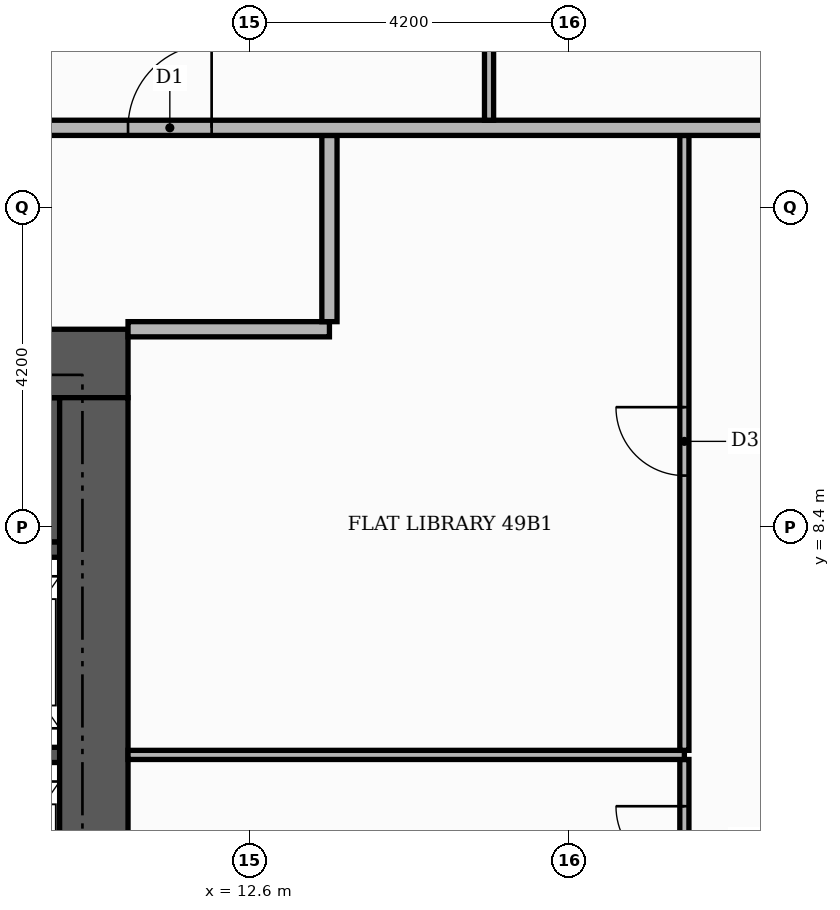
"""IFC4 building model, lengths in metres.
Left out: names, types, materials, properties, quantities, classifications, styles, units other than length and angle.
Written with IfcOpenShell. Run it as: python <this file> out.ifc"""

import sys

from ifc_helpers import new_model, si_unit, direction, frame, frame_2d, origin, place, context, subcontext, project, spatial, rectangle, extrude, element, fill, save


model = new_model("IFC4")
c1 = context("Model", 3, precision=1e-05, world=origin(), true_north=direction((0.0, 1.0)))
c2 = subcontext(c1, "Body", "Model", "MODEL_VIEW")
j1 = project(units=[si_unit("LENGTHUNIT", "METRE"), si_unit("PLANEANGLEUNIT", "RADIAN")], contexts=[c1])
p1 = place(None, origin())
s1 = spatial("IfcSite", under=j1, at=p1, CompositionType="ELEMENT")
p2 = place(p1, origin())
s2 = spatial("IfcBuilding", under=s1, at=p2, CompositionType="ELEMENT")
p3 = place(p2, frame((0.0, 0.0, 207.9)))
s3 = spatial("IfcBuildingStorey", under=s2, at=p3, CompositionType="ELEMENT", Elevation=207.9)
p4 = place(p3, frame((5.5, 9.15, 0.0), z_axis=(0.0, 0.0, 1.0), x_axis=(1.0, 0.0, 0.0)))
e1 = element("IfcWall", 1, at=p4, inside=s3, PredefinedType="SHEAR", context=c2, shape_type="SweptSolid", body=[
    extrude(rectangle(XDim=4.6, YDim=1.9, at=frame_2d((2.3, 0.0))), origin(), (0.0, 0.0, 1.0), 3.48),
])
for number, where, z_axis, x_axis in (
    (2, (8.1, 5.4, 0.0), (0.0, 0.0, 1.0), (1.0, 0.0, 0.0)),
    (3, (8.1, 8.1, 0.0), (0.0, 0.0, 1.0), (1.0, 0.0, 0.0)),
):
    element("IfcWall", number, at=place(p3, frame(where, z_axis=z_axis, x_axis=x_axis)), inside=s3, PredefinedType="SHEAR", context=c2, shape_type="SweptSolid", body=[
        extrude(rectangle(XDim=2.0, YDim=0.2, at=frame_2d((1.0, 0.0))), origin(), (0.0, 0.0, 1.0), 3.48),
    ])
p5 = place(p3, frame((-11.0, 10.55, 0.0), z_axis=(0.0, 0.0, 1.0), x_axis=(1.0, 0.0, 0.0)))
e4 = element("IfcWall", 4, at=p5, inside=s3, PredefinedType="SHEAR", context=c2, shape_type="SweptSolid", body=[
    extrude(rectangle(XDim=22.0, YDim=0.9, at=frame_2d((11.0, 0.0))), origin(), (0.0, 0.0, 1.0), 3.48),
])
p6 = place(p5, frame((13.3, 0.0, 0.0)))
e5 = element("IfcOpeningElement", 5, at=p6, cuts=e4, PredefinedType="OPENING", context=c2, shape_type="SweptSolid", body=[
    extrude(rectangle(XDim=1.8, YDim=2.2, at=frame_2d((0.9, 1.1))), frame((0.0, 0.46, 0.0), z_axis=(0.0, -1.0, 0.0), x_axis=(1.0, 0.0, 0.0)), (0.0, 0.0, 1.0), 0.92),
])
p7 = place(p3, frame((10.55, -10.1, 0.0), z_axis=(0.0, 0.0, 1.0), x_axis=(0.0, 1.0, 0.0)))
e6 = element("IfcWall", 6, at=p7, inside=s3, PredefinedType="SHEAR", context=c2, shape_type="SweptSolid", body=[
    extrude(rectangle(XDim=20.2, YDim=0.9, at=frame_2d((10.1, 0.0))), origin(), (0.0, 0.0, 1.0), 3.48),
])
p8 = place(p3, frame((18.32, 3.21, 0.0), z_axis=(0.0, 0.0, 1.0), x_axis=(0.0, 1.0, 0.0)))
e7 = element("IfcWall", 7, at=p8, inside=s3, PredefinedType="PARTITIONING", context=c2, shape_type="SweptSolid", body=[
    extrude(rectangle(XDim=2.13, YDim=0.12, at=frame_2d((1.065, 0.0))), origin(), (0.0, 0.0, 1.0), 3.48),
])
p9 = place(p8, frame((0.615, 0.0, 0.0)))
e8 = element("IfcOpeningElement", 8, at=p9, cuts=e7, PredefinedType="OPENING", context=c2, shape_type="SweptSolid", body=[
    extrude(rectangle(XDim=0.9, YDim=2.1, at=frame_2d((0.45, 1.05))), frame((0.0, 0.07, 0.0), z_axis=(0.0, -1.0, 0.0), x_axis=(1.0, 0.0, 0.0)), (0.0, 0.0, 1.0), 0.14),
])
p10 = place(p3, frame((11.0, 5.4, 0.0), z_axis=(0.0, 0.0, 1.0), x_axis=(1.0, 0.0, 0.0)))
e9 = element("IfcWall", 9, at=p10, inside=s3, PredefinedType="PARTITIONING", context=c2, shape_type="SweptSolid", body=[
    extrude(rectangle(XDim=7.32, YDim=0.12, at=frame_2d((3.66, 0.0))), origin(), (0.0, 0.0, 1.0), 3.48),
])
p11 = place(p3, frame((18.32, 5.46, 0.0), z_axis=(0.0, 0.0, 1.0), x_axis=(0.0, 1.0, 0.0)))
e10 = element("IfcWall", 10, at=p11, inside=s3, PredefinedType="PARTITIONING", context=c2, shape_type="SweptSolid", body=[
    extrude(rectangle(XDim=8.09, YDim=0.12, at=frame_2d((4.045, 0.0))), origin(), (0.0, 0.0, 1.0), 3.48),
])
p12 = place(p11, frame((3.615, 0.0, 0.0)))
e11 = element("IfcOpeningElement", 11, at=p12, cuts=e10, PredefinedType="OPENING", context=c2, shape_type="SweptSolid", body=[
    extrude(rectangle(XDim=0.9, YDim=2.1, at=frame_2d((0.45, 1.05))), frame((0.0, 0.07, 0.0), z_axis=(0.0, -1.0, 0.0), x_axis=(1.0, 0.0, 0.0)), (0.0, 0.0, 1.0), 0.14),
])
p13 = place(p3, frame((11.0, 11.0, 0.0), z_axis=(0.0, 0.0, 1.0), x_axis=(1.0, 0.0, 0.0)))
e12 = element("IfcWall", 12, at=p13, inside=s3, PredefinedType="PARTITIONING", context=c2, shape_type="SweptSolid", body=[
    extrude(rectangle(XDim=2.65, YDim=0.2, at=frame_2d((1.325, 0.0))), origin(), (0.0, 0.0, 1.0), 3.48),
])
p14 = place(p3, frame((13.65, 11.1, 0.0), z_axis=(0.0, 0.0, 1.0), x_axis=(0.0, 1.0, 0.0)))
e13 = element("IfcWall", 13, at=p14, inside=s3, PredefinedType="PARTITIONING", context=c2, shape_type="SweptSolid", body=[
    extrude(rectangle(XDim=2.45, YDim=0.2, at=frame_2d((1.225, 0.0))), origin(), (0.0, 0.0, 1.0), 3.48),
])
p15 = place(p3, frame((-13.65, 13.65, 0.0), z_axis=(0.0, 0.0, 1.0), x_axis=(1.0, 0.0, 0.0)))
e14 = element("IfcWall", 14, at=p15, inside=s3, PredefinedType="PARTITIONING", context=c2, shape_type="SweptSolid", body=[
    extrude(rectangle(XDim=39.07, YDim=0.2, at=frame_2d((19.535, 0.0))), origin(), (0.0, 0.0, 1.0), 3.48),
])
p16 = place(p15, frame((24.65, 0.0, 0.0)))
e15 = element("IfcOpeningElement", 15, at=p16, cuts=e14, PredefinedType="OPENING", context=c2, shape_type="SweptSolid", body=[
    extrude(rectangle(XDim=1.1, YDim=2.4, at=frame_2d((0.55, 1.2))), frame((0.0, 0.11, 0.0), z_axis=(0.0, -1.0, 0.0), x_axis=(1.0, 0.0, 0.0)), (0.0, 0.0, 1.0), 0.22),
])
p17 = place(p15, frame((12.05, 0.0, 0.0)))
e16 = element("IfcOpeningElement", 16, at=p17, cuts=e14, PredefinedType="OPENING", context=c2, shape_type="SweptSolid", body=[
    extrude(rectangle(XDim=1.1, YDim=2.4, at=frame_2d((0.55, 1.2))), frame((0.0, 0.11, 0.0), z_axis=(0.0, -1.0, 0.0), x_axis=(1.0, 0.0, 0.0)), (0.0, 0.0, 1.0), 0.22),
])
p18 = place(p3, frame((15.75, 13.75, 0.0), z_axis=(0.0, 0.0, 1.0), x_axis=(0.0, 1.0, 0.0)))
e17 = element("IfcWall", 17, at=p18, inside=s3, PredefinedType="PARTITIONING", context=c2, shape_type="SweptSolid", body=[
    extrude(rectangle(XDim=6.01, YDim=0.12, at=frame_2d((3.005, 0.0))), origin(), (0.0, 0.0, 1.0), 3.48),
])
p19 = place(p18, frame((2.485, 0.0, 0.0)))
e18 = element("IfcOpeningElement", 18, at=p19, cuts=e17, PredefinedType="OPENING", context=c2, shape_type="SweptSolid", body=[
    extrude(rectangle(XDim=1.0, YDim=2.1, at=frame_2d((0.5, 1.05))), frame((0.0, 0.07, 0.0), z_axis=(0.0, -1.0, 0.0), x_axis=(1.0, 0.0, 0.0)), (0.0, 0.0, 1.0), 0.14),
])
p20 = place(p9, origin())
e19 = element("IfcDoor", 19, at=p20, inside=s3, OperationType="SINGLE_SWING_RIGHT", PredefinedType="DOOR", context=c2, shape_type="SweptSolid", body=[
    extrude(rectangle(XDim=0.9, YDim=2.1, at=frame_2d((0.45, 1.05))), frame((0.0, 0.025, 0.0), z_axis=(0.0, -1.0, 0.0), x_axis=(1.0, 0.0, 0.0)), (0.0, 0.0, 1.0), 0.05),
])
fill(e8, e19)
p21 = place(p12, origin())
e20 = element("IfcDoor", 20, at=p21, inside=s3, OperationType="SINGLE_SWING_RIGHT", PredefinedType="DOOR", context=c2, shape_type="SweptSolid", body=[
    extrude(rectangle(XDim=0.9, YDim=2.1, at=frame_2d((0.45, 1.05))), frame((0.0, 0.025, 0.0), z_axis=(0.0, -1.0, 0.0), x_axis=(1.0, 0.0, 0.0)), (0.0, 0.0, 1.0), 0.05),
])
fill(e11, e20)
p22 = place(p16, origin())
e21 = element("IfcDoor", 21, at=p22, inside=s3, OperationType="SINGLE_SWING_RIGHT", PredefinedType="DOOR", context=c2, shape_type="SweptSolid", body=[
    extrude(rectangle(XDim=1.1, YDim=2.4, at=frame_2d((0.55, 1.2))), frame((0.0, 0.025, 0.0), z_axis=(0.0, -1.0, 0.0), x_axis=(1.0, 0.0, 0.0)), (0.0, 0.0, 1.0), 0.05),
])
fill(e15, e21)
save(model, sys.argv[1])
